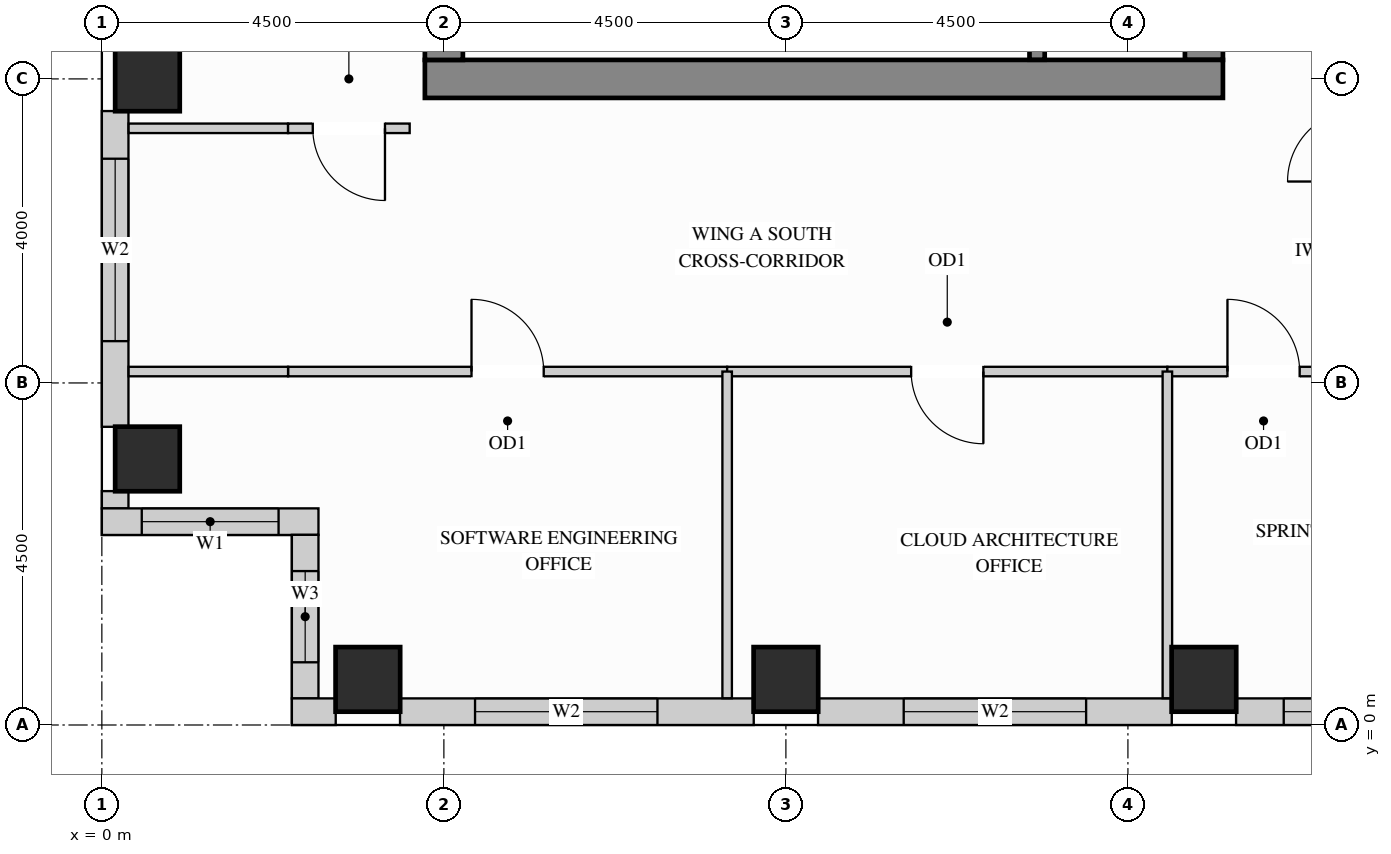
"""IFC4 building model, lengths in metres.
Left out: names, types, materials, properties, quantities, classifications, styles, units other than length and angle.
Written with IfcOpenShell. Run it as: python <this file> out.ifc"""

import sys

from ifc_helpers import new_model, si_unit, direction, frame, frame_2d, origin, origin_2d, place, context, subcontext, project, spatial, rectangle, extrude, source, transform, mapped, element, fill, save


model = new_model("IFC4")
c1 = context("Model", 3, precision=1e-05, world=origin(), true_north=direction((0.0, 1.0)))
c2 = subcontext(c1, "Body", "Model", "MODEL_VIEW")
j1 = project(units=[si_unit("LENGTHUNIT", "METRE"), si_unit("PLANEANGLEUNIT", "RADIAN")], contexts=[c1])
p1 = place(None, origin())
s1 = spatial("IfcSite", under=j1, at=p1, CompositionType="ELEMENT")
p2 = place(p1, origin())
s2 = spatial("IfcBuilding", under=s1, at=p2, CompositionType="ELEMENT")
p3 = place(p2, frame((0.0, 0.0, 234.0)))
s3 = spatial("IfcBuildingStorey", under=s2, at=p3, CompositionType="ELEMENT", Elevation=234.0)
m1 = source(origin(), c2, "Body", "SweptSolid", [
    extrude(rectangle(XDim=0.85, YDim=0.85, at=origin_2d()), origin(), (0.0, 0.0, 1.0), 3.4),
])
for number, where, z_axis, x_axis in (
    (1, (14.5, 0.6, 0.0), (0.0, 0.0, 1.0), (1.0, 0.0, 0.0)),
    (2, (3.5, 0.6, 0.0), (0.0, 0.0, 1.0), (1.0, 0.0, 0.0)),
    (3, (9.0, 0.6, 0.0), (0.0, 0.0, 1.0), (1.0, 0.0, 0.0)),
    (4, (0.6, 3.5, 0.0), (0.0, 0.0, 1.0), (1.0, 0.0, 0.0)),
    (5, (0.6, 8.5, 0.0), (0.0, 0.0, 1.0), (1.0, 0.0, 0.0)),
):
    element("IfcColumn", number, at=place(p3, frame(where, z_axis=z_axis, x_axis=x_axis)), inside=s3, PredefinedType="COLUMN", context=c2, shape_type="MappedRepresentation", body=[
        mapped(m1, transform((0.0, 0.0, 0.0), x_axis=(1.0, 0.0, 0.0), y_axis=(0.0, 1.0, 0.0), z_axis=(0.0, 0.0, 1.0))),
    ])
m2 = source(origin(), c2, "Body", "SweptSolid", [
    extrude(rectangle(XDim=10.07, YDim=0.5, at=frame_2d((5.035, 0.0))), origin(), (0.0, 0.0, 1.0), 3.4),
])
p4 = place(p3, frame((14.5, 8.75, 0.0), z_axis=(0.0, 0.0, 1.0), x_axis=(0.0, 1.0, 0.0)))
e6 = element("IfcWall", 6, at=p4, inside=s3, PredefinedType="SHEAR", context=c2, shape_type="MappedRepresentation", body=[
    mapped(m2, transform((0.0, 0.0, 0.0), x_axis=(1.0, 0.0, 0.0), y_axis=(0.0, 1.0, 0.0), z_axis=(0.0, 0.0, 1.0))),
])
m3 = source(origin(), c2, "Body", "SweptSolid", [
    extrude(rectangle(XDim=10.5, YDim=0.5, at=frame_2d((5.25, 0.0))), origin(), (0.0, 0.0, 1.0), 3.4),
])
p5 = place(p3, frame((4.25, 8.5, 0.0), z_axis=(0.0, 0.0, 1.0), x_axis=(1.0, 0.0, 0.0)))
e7 = element("IfcWall", 7, at=p5, inside=s3, PredefinedType="SHEAR", context=c2, shape_type="MappedRepresentation", body=[
    mapped(m3, transform((0.0, 0.0, 0.0), x_axis=(1.0, 0.0, 0.0), y_axis=(0.0, 1.0, 0.0), z_axis=(0.0, 0.0, 1.0))),
])
m4 = source(origin(), c2, "Body", "SweptSolid", [
    extrude(rectangle(XDim=20.5, YDim=0.5, at=frame_2d((10.25, 0.0))), origin(), (0.0, 0.0, 1.0), 3.4),
])
p6 = place(p3, frame((4.5, 8.75, 0.0), z_axis=(0.0, 0.0, 1.0), x_axis=(0.0, 1.0, 0.0)))
e8 = element("IfcWall", 8, at=p6, inside=s3, PredefinedType="SHEAR", context=c2, shape_type="MappedRepresentation", body=[
    mapped(m4, transform((0.0, 0.0, 0.0), x_axis=(1.0, 0.0, 0.0), y_axis=(0.0, 1.0, 0.0), z_axis=(0.0, 0.0, 1.0))),
])
p7 = place(p3, frame((0.175, 8.077, 0.0), z_axis=(0.0, 0.0, 1.0), x_axis=(0.0, -1.0, 0.0)))
e9 = element("IfcWall", 9, at=p7, inside=s3, PredefinedType="SOLIDWALL", context=c2, shape_type="SweptSolid", body=[
    extrude(rectangle(XDim=4.154, YDim=0.35, at=frame_2d((2.077, 0.0))), origin(), (0.0, 0.0, 1.0), 3.385),
])
p8 = place(p7, frame((0.627, 0.0, 0.78)))
e10 = element("IfcOpeningElement", 10, at=p8, cuts=e9, PredefinedType="OPENING", context=c2, shape_type="SweptSolid", body=[
    extrude(rectangle(XDim=2.4, YDim=2.1, at=frame_2d((1.2, 1.05))), frame((0.0, 0.185, 0.0), z_axis=(0.0, -1.0, 0.0), x_axis=(1.0, 0.0, 0.0)), (0.0, 0.0, 1.0), 0.37),
])
m5 = source(origin(), c2, "Body", "SweptSolid", [
    extrude(rectangle(XDim=0.229, YDim=0.35, at=frame_2d((0.115, 0.0))), origin(), (0.0, 0.0, 1.0), 3.385),
])
p9 = place(p3, frame((0.175, 3.077, 0.0), z_axis=(0.0, 0.0, 1.0), x_axis=(0.0, -1.0, 0.0)))
e11 = element("IfcWall", 11, at=p9, inside=s3, PredefinedType="SOLIDWALL", context=c2, shape_type="MappedRepresentation", body=[
    mapped(m5, transform((0.0, 0.0, 0.0), x_axis=(1.0, 0.0, 0.0), y_axis=(0.0, 1.0, 0.0), z_axis=(0.0, 0.0, 1.0))),
])
p10 = place(p3, frame((0.0, 2.675, 0.0), z_axis=(0.0, 0.0, 1.0), x_axis=(1.0, 0.0, 0.0)))
e12 = element("IfcWall", 12, at=p10, inside=s3, PredefinedType="SOLIDWALL", context=c2, shape_type="SweptSolid", body=[
    extrude(rectangle(XDim=2.85, YDim=0.35, at=frame_2d((1.425, 0.0))), origin(), (0.0, 0.0, 1.0), 3.385),
])
p11 = place(p10, frame((0.525, 0.0, 0.78)))
e13 = element("IfcOpeningElement", 13, at=p11, cuts=e12, PredefinedType="OPENING", context=c2, shape_type="SweptSolid", body=[
    extrude(rectangle(XDim=1.8, YDim=2.1, at=frame_2d((0.9, 1.05))), frame((0.0, 0.185, 0.0), z_axis=(0.0, -1.0, 0.0), x_axis=(1.0, 0.0, 0.0)), (0.0, 0.0, 1.0), 0.37),
])
p12 = place(p3, frame((2.675, 2.502, 0.0), z_axis=(0.0, 0.0, 1.0), x_axis=(0.0, -1.0, 0.0)))
e14 = element("IfcWall", 14, at=p12, inside=s3, PredefinedType="SOLIDWALL", context=c2, shape_type="SweptSolid", body=[
    extrude(rectangle(XDim=2.154, YDim=0.35, at=frame_2d((1.077, 0.0))), origin(), (0.0, 0.0, 1.0), 3.385),
])
p13 = place(p12, frame((0.477, 0.0, 0.78)))
e15 = element("IfcOpeningElement", 15, at=p13, cuts=e14, PredefinedType="OPENING", context=c2, shape_type="SweptSolid", body=[
    extrude(rectangle(XDim=1.2, YDim=2.1, at=frame_2d((0.6, 1.05))), frame((0.0, 0.185, 0.0), z_axis=(0.0, -1.0, 0.0), x_axis=(1.0, 0.0, 0.0)), (0.0, 0.0, 1.0), 0.37),
])
m6 = source(origin(), c2, "Body", "SweptSolid", [
    extrude(rectangle(XDim=0.577, YDim=0.35, at=frame_2d((0.289, 0.0))), origin(), (0.0, 0.0, 1.0), 3.385),
])
p14 = place(p3, frame((2.5, 0.175, 0.0), z_axis=(0.0, 0.0, 1.0), x_axis=(1.0, 0.0, 0.0)))
e16 = element("IfcWall", 16, at=p14, inside=s3, PredefinedType="SOLIDWALL", context=c2, shape_type="MappedRepresentation", body=[
    mapped(m6, transform((0.0, 0.0, 0.0), x_axis=(1.0, 0.0, 0.0), y_axis=(0.0, 1.0, 0.0), z_axis=(0.0, 0.0, 1.0))),
])
p15 = place(p3, frame((3.923, 0.175, 0.0), z_axis=(0.0, 0.0, 1.0), x_axis=(1.0, 0.0, 0.0)))
e17 = element("IfcWall", 17, at=p15, inside=s3, PredefinedType="SOLIDWALL", context=c2, shape_type="SweptSolid", body=[
    extrude(rectangle(XDim=4.654, YDim=0.35, at=frame_2d((2.327, 0.0))), origin(), (0.0, 0.0, 1.0), 3.385),
])
p16 = place(p15, frame((0.987, 0.0, 0.78)))
e18 = element("IfcOpeningElement", 18, at=p16, cuts=e17, PredefinedType="OPENING", context=c2, shape_type="SweptSolid", body=[
    extrude(rectangle(XDim=2.4, YDim=2.1, at=frame_2d((1.2, 1.05))), frame((0.0, 0.185, 0.0), z_axis=(0.0, -1.0, 0.0), x_axis=(1.0, 0.0, 0.0)), (0.0, 0.0, 1.0), 0.37),
])
p17 = place(p3, frame((9.423, 0.175, 0.0), z_axis=(0.0, 0.0, 1.0), x_axis=(1.0, 0.0, 0.0)))
e19 = element("IfcWall", 19, at=p17, inside=s3, PredefinedType="SOLIDWALL", context=c2, shape_type="SweptSolid", body=[
    extrude(rectangle(XDim=4.654, YDim=0.35, at=frame_2d((2.327, 0.0))), origin(), (0.0, 0.0, 1.0), 3.385),
])
p18 = place(p17, frame((1.127, 0.0, 0.78)))
e20 = element("IfcOpeningElement", 20, at=p18, cuts=e19, PredefinedType="OPENING", context=c2, shape_type="SweptSolid", body=[
    extrude(rectangle(XDim=2.4, YDim=2.1, at=frame_2d((1.2, 1.05))), frame((0.0, 0.185, 0.0), z_axis=(0.0, -1.0, 0.0), x_axis=(1.0, 0.0, 0.0)), (0.0, 0.0, 1.0), 0.37),
])
p19 = place(p3, frame((14.923, 0.175, 0.0), z_axis=(0.0, 0.0, 1.0), x_axis=(1.0, 0.0, 0.0)))
e21 = element("IfcWall", 21, at=p19, inside=s3, PredefinedType="SOLIDWALL", context=c2, shape_type="SweptSolid", body=[
    extrude(rectangle(XDim=3.654, YDim=0.35, at=frame_2d((1.827, 0.0))), origin(), (0.0, 0.0, 1.0), 3.385),
])
p20 = place(p19, frame((0.627, 0.0, 0.78)))
e22 = element("IfcOpeningElement", 22, at=p20, cuts=e21, PredefinedType="OPENING", context=c2, shape_type="SweptSolid", body=[
    extrude(rectangle(XDim=2.4, YDim=2.1, at=frame_2d((1.2, 1.05))), frame((0.0, 0.185, 0.0), z_axis=(0.0, -1.0, 0.0), x_axis=(1.0, 0.0, 0.0)), (0.0, 0.0, 1.0), 0.37),
])
m7 = source(origin(), c2, "Body", "SweptSolid", [
    extrude(rectangle(XDim=2.098, YDim=0.125, at=frame_2d((1.049, 0.0))), origin(), (0.0, 0.0, 1.0), 3.385),
])
p21 = place(p3, frame((0.352, 7.85, 0.0), z_axis=(0.0, 0.0, 1.0), x_axis=(1.0, 0.0, 0.0)))
e23 = element("IfcWall", 23, at=p21, inside=s3, PredefinedType="PARTITIONING", context=c2, shape_type="MappedRepresentation", body=[
    mapped(m7, transform((0.0, 0.0, 0.0), x_axis=(1.0, 0.0, 0.0), y_axis=(0.0, 1.0, 0.0), z_axis=(0.0, 0.0, 1.0))),
])
p22 = place(p3, frame((2.45, 7.85, 0.0), z_axis=(0.0, 0.0, 1.0), x_axis=(1.0, 0.0, 0.0)))
e24 = element("IfcWall", 24, at=p22, inside=s3, PredefinedType="PARTITIONING", context=c2, shape_type="SweptSolid", body=[
    extrude(rectangle(XDim=1.6, YDim=0.125, at=frame_2d((0.8, 0.0))), origin(), (0.0, 0.0, 1.0), 3.385),
])
p23 = place(p22, frame((0.325, 0.0, 0.0)))
e25 = element("IfcOpeningElement", 25, at=p23, cuts=e24, PredefinedType="OPENING", context=c2, shape_type="SweptSolid", body=[
    extrude(rectangle(XDim=0.95, YDim=2.15, at=frame_2d((0.475, 1.075))), frame((0.0, 0.073, 0.0), z_axis=(0.0, -1.0, 0.0), x_axis=(1.0, 0.0, 0.0)), (0.0, 0.0, 1.0), 0.145),
])
p24 = place(p3, frame((2.45, 4.65, 0.0), z_axis=(0.0, 0.0, 1.0), x_axis=(1.0, 0.0, 0.0)))
e26 = element("IfcWall", 26, at=p24, inside=s3, PredefinedType="PARTITIONING", context=c2, shape_type="SweptSolid", body=[
    extrude(rectangle(XDim=5.777, YDim=0.125, at=frame_2d((2.889, 0.0))), origin(), (0.0, 0.0, 1.0), 2.848),
])
p25 = place(p24, frame((2.414, 0.0, 0.0)))
e27 = element("IfcOpeningElement", 27, at=p25, cuts=e26, PredefinedType="OPENING", context=c2, shape_type="SweptSolid", body=[
    extrude(rectangle(XDim=0.95, YDim=2.15, at=frame_2d((0.475, 1.075))), frame((0.0, 0.073, 0.0), z_axis=(0.0, -1.0, 0.0), x_axis=(1.0, 0.0, 0.0)), (0.0, 0.0, 1.0), 0.145),
])
p26 = place(p3, frame((8.227, 4.65, 0.0), z_axis=(0.0, 0.0, 1.0), x_axis=(1.0, 0.0, 0.0)))
e28 = element("IfcWall", 28, at=p26, inside=s3, PredefinedType="PARTITIONING", context=c2, shape_type="SweptSolid", body=[
    extrude(rectangle(XDim=5.792, YDim=0.125, at=frame_2d((2.896, 0.0))), origin(), (0.0, 0.0, 1.0), 2.848),
])
p27 = place(p26, frame((2.421, 0.0, 0.0)))
e29 = element("IfcOpeningElement", 29, at=p27, cuts=e28, PredefinedType="OPENING", context=c2, shape_type="SweptSolid", body=[
    extrude(rectangle(XDim=0.95, YDim=2.15, at=frame_2d((0.475, 1.075))), frame((0.0, 0.073, 0.0), z_axis=(0.0, -1.0, 0.0), x_axis=(1.0, 0.0, 0.0)), (0.0, 0.0, 1.0), 0.145),
])
p28 = place(p3, frame((14.019, 4.65, 0.0), z_axis=(0.0, 0.0, 1.0), x_axis=(1.0, 0.0, 0.0)))
e30 = element("IfcWall", 30, at=p28, inside=s3, PredefinedType="PARTITIONING", context=c2, shape_type="SweptSolid", body=[
    extrude(rectangle(XDim=2.531, YDim=0.125, at=frame_2d((1.266, 0.0))), origin(), (0.0, 0.0, 1.0), 2.848),
])
p29 = place(p28, frame((0.791, 0.0, 0.0)))
e31 = element("IfcOpeningElement", 31, at=p29, cuts=e30, PredefinedType="OPENING", context=c2, shape_type="SweptSolid", body=[
    extrude(rectangle(XDim=0.95, YDim=2.15, at=frame_2d((0.475, 1.075))), frame((0.0, 0.073, 0.0), z_axis=(0.0, -1.0, 0.0), x_axis=(1.0, 0.0, 0.0)), (0.0, 0.0, 1.0), 0.145),
])
m8 = source(origin(), c2, "Body", "SweptSolid", [
    extrude(rectangle(XDim=2.098, YDim=0.125, at=frame_2d((1.049, 0.0))), origin(), (0.0, 0.0, 1.0), 2.848),
])
p30 = place(p3, frame((0.352, 4.65, 0.0), z_axis=(0.0, 0.0, 1.0), x_axis=(1.0, 0.0, 0.0)))
e32 = element("IfcWall", 32, at=p30, inside=s3, PredefinedType="PARTITIONING", context=c2, shape_type="MappedRepresentation", body=[
    mapped(m8, transform((0.0, 0.0, 0.0), x_axis=(1.0, 0.0, 0.0), y_axis=(0.0, 1.0, 0.0), z_axis=(0.0, 0.0, 1.0))),
])
m9 = source(origin(), c2, "Body", "SweptSolid", [
    extrude(rectangle(XDim=4.298, YDim=0.125, at=frame_2d((2.149, 0.0))), origin(), (0.0, 0.0, 1.0), 3.385),
])
for number, where, z_axis, x_axis in (
    (33, (8.227, 0.352, 0.0), (0.0, 0.0, 1.0), (0.0, 1.0, 0.0)),
    (34, (14.019, 0.352, 0.0), (0.0, 0.0, 1.0), (0.0, 1.0, 0.0)),
):
    element("IfcWall", number, at=place(p3, frame(where, z_axis=z_axis, x_axis=x_axis)), inside=s3, PredefinedType="PARTITIONING", context=c2, shape_type="MappedRepresentation", body=[
        mapped(m9, transform((0.0, 0.0, 0.0), x_axis=(1.0, 0.0, 0.0), y_axis=(0.0, 1.0, 0.0), z_axis=(0.0, 0.0, 1.0))),
    ])
m10 = source(origin(), c2, "Body", "SweptSolid", [
    extrude(rectangle(XDim=3.803, YDim=0.2, at=frame_2d((1.901, 0.0))), origin(), (0.0, 0.0, 1.0), 3.4),
])
p31 = place(p3, frame((12.305, 8.752, 0.0), z_axis=(0.0, 0.0, 1.0), x_axis=(0.0, 1.0, 0.0)))
e35 = element("IfcWall", 35, at=p31, inside=s3, PredefinedType="SHEAR", context=c2, shape_type="MappedRepresentation", body=[
    mapped(m10, transform((0.0, 0.0, 0.0), x_axis=(1.0, 0.0, 0.0), y_axis=(0.0, 1.0, 0.0), z_axis=(0.0, 0.0, 1.0))),
])
m11 = source(origin(), c2, "Body", "SweptSolid", [
    extrude(rectangle(XDim=0.95, YDim=2.15, at=frame_2d((0.475, 1.075))), frame((0.0, 0.025, 0.0), z_axis=(0.0, -1.0, 0.0), x_axis=(1.0, 0.0, 0.0)), (0.0, 0.0, 1.0), 0.05),
])
p32 = place(p25, origin())
e36 = element("IfcDoor", 36, at=p32, inside=s3, OperationType="SINGLE_SWING_LEFT", PredefinedType="DOOR", context=c2, shape_type="MappedRepresentation", body=[
    mapped(m11, transform((0.0, 0.0, 0.0), x_axis=(1.0, 0.0, 0.0), y_axis=(0.0, 1.0, 0.0), z_axis=(0.0, 0.0, 1.0))),
])
fill(e27, e36)
p33 = place(p27, origin())
e37 = element("IfcDoor", 37, at=p33, inside=s3, OperationType="SINGLE_SWING_RIGHT", PredefinedType="DOOR", context=c2, shape_type="MappedRepresentation", body=[
    mapped(m11, transform((0.0, 0.0, 0.0), x_axis=(1.0, 0.0, 0.0), y_axis=(0.0, 1.0, 0.0), z_axis=(0.0, 0.0, 1.0))),
])
fill(e29, e37)
p34 = place(p29, origin())
e38 = element("IfcDoor", 38, at=p34, inside=s3, OperationType="SINGLE_SWING_LEFT", PredefinedType="DOOR", context=c2, shape_type="MappedRepresentation", body=[
    mapped(m11, transform((0.0, 0.0, 0.0), x_axis=(1.0, 0.0, 0.0), y_axis=(0.0, 1.0, 0.0), z_axis=(0.0, 0.0, 1.0))),
])
fill(e31, e38)
p35 = place(p23, origin())
e39 = element("IfcDoor", 39, at=p35, inside=s3, OperationType="SINGLE_SWING_RIGHT", PredefinedType="DOOR", context=c2, shape_type="MappedRepresentation", body=[
    mapped(m11, transform((0.0, 0.0, 0.0), x_axis=(1.0, 0.0, 0.0), y_axis=(0.0, 1.0, 0.0), z_axis=(0.0, 0.0, 1.0))),
])
fill(e25, e39)
m12 = source(origin(), c2, "Body", "SweptSolid", [
    extrude(rectangle(XDim=1.8, YDim=2.1, at=frame_2d((0.9, 1.05))), frame((0.0, 0.03, 0.0), z_axis=(0.0, -1.0, 0.0), x_axis=(1.0, 0.0, 0.0)), (0.0, 0.0, 1.0), 0.06),
])
p36 = place(p11, origin())
e40 = element("IfcWindow", 40, at=p36, inside=s3, PartitioningType="SINGLE_PANEL", PredefinedType="WINDOW", context=c2, shape_type="MappedRepresentation", body=[
    mapped(m12, transform((0.0, 0.0, 0.0), x_axis=(1.0, 0.0, 0.0), y_axis=(0.0, 1.0, 0.0), z_axis=(0.0, 0.0, 1.0))),
])
fill(e13, e40)
m13 = source(origin(), c2, "Body", "SweptSolid", [
    extrude(rectangle(XDim=2.4, YDim=2.1, at=frame_2d((1.2, 1.05))), frame((0.0, 0.03, 0.0), z_axis=(0.0, -1.0, 0.0), x_axis=(1.0, 0.0, 0.0)), (0.0, 0.0, 1.0), 0.06),
])
p37 = place(p8, origin())
e41 = element("IfcWindow", 41, at=p37, inside=s3, PartitioningType="SINGLE_PANEL", PredefinedType="WINDOW", context=c2, shape_type="MappedRepresentation", body=[
    mapped(m13, transform((0.0, 0.0, 0.0), x_axis=(1.0, 0.0, 0.0), y_axis=(0.0, 1.0, 0.0), z_axis=(0.0, 0.0, 1.0))),
])
fill(e10, e41)
p38 = place(p16, origin())
e42 = element("IfcWindow", 42, at=p38, inside=s3, PartitioningType="SINGLE_PANEL", PredefinedType="WINDOW", context=c2, shape_type="MappedRepresentation", body=[
    mapped(m13, transform((0.0, 0.0, 0.0), x_axis=(1.0, 0.0, 0.0), y_axis=(0.0, 1.0, 0.0), z_axis=(0.0, 0.0, 1.0))),
])
fill(e18, e42)
p39 = place(p18, origin())
e43 = element("IfcWindow", 43, at=p39, inside=s3, PartitioningType="SINGLE_PANEL", PredefinedType="WINDOW", context=c2, shape_type="MappedRepresentation", body=[
    mapped(m13, transform((0.0, 0.0, 0.0), x_axis=(1.0, 0.0, 0.0), y_axis=(0.0, 1.0, 0.0), z_axis=(0.0, 0.0, 1.0))),
])
fill(e20, e43)
p40 = place(p20, origin())
e44 = element("IfcWindow", 44, at=p40, inside=s3, PartitioningType="SINGLE_PANEL", PredefinedType="WINDOW", context=c2, shape_type="MappedRepresentation", body=[
    mapped(m13, transform((0.0, 0.0, 0.0), x_axis=(1.0, 0.0, 0.0), y_axis=(0.0, 1.0, 0.0), z_axis=(0.0, 0.0, 1.0))),
])
fill(e22, e44)
m14 = source(origin(), c2, "Body", "SweptSolid", [
    extrude(rectangle(XDim=1.2, YDim=2.1, at=frame_2d((0.6, 1.05))), frame((0.0, 0.03, 0.0), z_axis=(0.0, -1.0, 0.0), x_axis=(1.0, 0.0, 0.0)), (0.0, 0.0, 1.0), 0.06),
])
p41 = place(p13, origin())
e45 = element("IfcWindow", 45, at=p41, inside=s3, PartitioningType="SINGLE_PANEL", PredefinedType="WINDOW", context=c2, shape_type="MappedRepresentation", body=[
    mapped(m14, transform((0.0, 0.0, 0.0), x_axis=(1.0, 0.0, 0.0), y_axis=(0.0, 1.0, 0.0), z_axis=(0.0, 0.0, 1.0))),
])
fill(e15, e45)
save(model, sys.argv[1])
